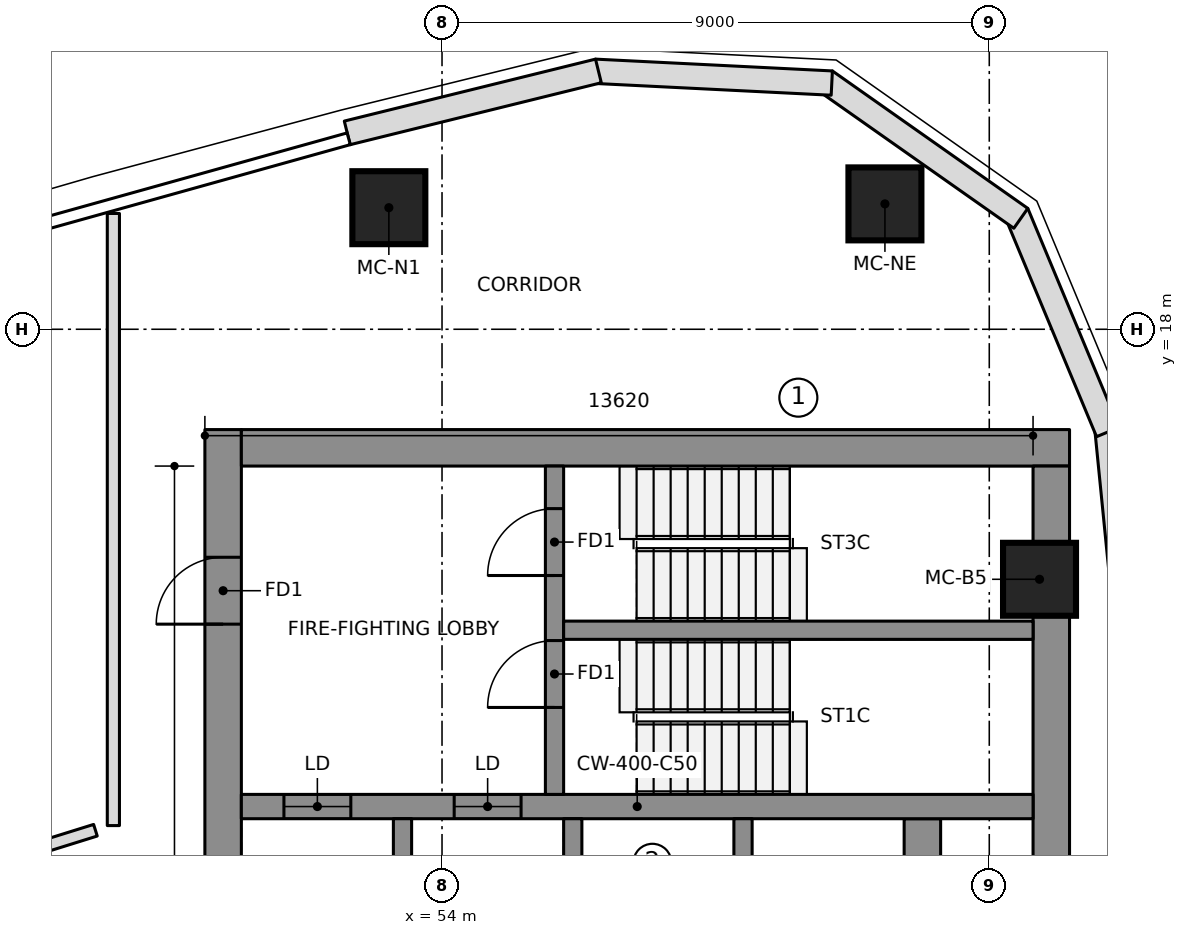
"""IFC4 building model, lengths in metres.
Left out: names, types, materials, properties, quantities, classifications, styles, units other than length and angle.
Written with IfcOpenShell. Run it as: python <this file> out.ifc"""

import sys

from ifc_helpers import new_model, si_unit, direction, frame, frame_2d, origin, origin_2d, place, context, subcontext, project, spatial, polyline, rectangle, outline, extrude, element, fill, save


model = new_model("IFC4")
c1 = context("Model", 3, precision=1e-05, world=origin(), true_north=direction((0.0, 1.0)))
c2 = subcontext(c1, "Body", "Model", "MODEL_VIEW")
j1 = project(units=[si_unit("LENGTHUNIT", "METRE"), si_unit("PLANEANGLEUNIT", "RADIAN")], contexts=[c1])
p1 = place(None, origin())
s1 = spatial("IfcSite", under=j1, at=p1, CompositionType="ELEMENT")
p2 = place(p1, origin())
s2 = spatial("IfcBuilding", under=s1, at=p2, CompositionType="ELEMENT")
p3 = place(p2, frame((0.0, 0.0, 231.45)))
s3 = spatial("IfcBuildingStorey", under=s2, at=p3, CompositionType="ELEMENT", Elevation=231.45)
p4 = place(p3, frame((50.4, 6.65, 0.0), z_axis=(0.0, 0.0, 1.0), x_axis=(0.0, 1.0, 0.0)))
e1 = element("IfcWall", 1, at=p4, inside=s3, PredefinedType="SHEAR", context=c2, shape_type="SweptSolid", body=[
    extrude(rectangle(XDim=9.7, YDim=0.6, at=frame_2d((4.85, 0.0))), origin(), (0.0, 0.0, 1.0), 3.55),
])
p5 = place(p4, frame((6.5, 0.0, 0.0)))
e2 = element("IfcOpeningElement", 2, at=p5, cuts=e1, PredefinedType="OPENING", context=c2, shape_type="SweptSolid", body=[
    extrude(rectangle(XDim=1.1, YDim=2.1, at=frame_2d((0.55, 1.05))), frame((0.0, 0.31, 0.0), z_axis=(0.0, -1.0, 0.0), x_axis=(1.0, 0.0, 0.0)), (0.0, 0.0, 1.0), 0.62),
])
p6 = place(p3, frame((50.7, 16.05, 0.0), z_axis=(0.0, 0.0, 1.0), x_axis=(1.0, 0.0, 0.0)))
e3 = element("IfcWall", 3, at=p6, inside=s3, PredefinedType="SHEAR", context=c2, shape_type="SweptSolid", body=[
    extrude(rectangle(XDim=13.62, YDim=0.6, at=frame_2d((6.81, 0.0))), origin(), (0.0, 0.0, 1.0), 3.55),
])
p7 = place(p3, frame((64.02, 7.502, 0.0), z_axis=(0.0, 0.0, 1.0), x_axis=(0.0, 1.0, 0.0)))
e4 = element("IfcWall", 4, at=p7, inside=s3, PredefinedType="SHEAR", context=c2, shape_type="SweptSolid", body=[
    extrude(rectangle(XDim=8.248, YDim=0.6, at=frame_2d((4.124, 0.0))), origin(), (0.0, 0.0, 1.0), 3.55),
])
p8 = place(p3, frame((61.9, -9.95, 0.0), z_axis=(0.0, 0.0, 1.0), x_axis=(0.0, 1.0, 0.0)))
e5 = element("IfcWall", 5, at=p8, inside=s3, PredefinedType="SHEAR", context=c2, shape_type="SweptSolid", body=[
    extrude(rectangle(XDim=19.9, YDim=0.6, at=frame_2d((9.95, 0.0))), origin(), (0.0, 0.0, 1.0), 3.55),
])
p9 = place(p3, frame((50.7, 10.15, 0.0), z_axis=(0.0, 0.0, 1.0), x_axis=(1.0, 0.0, 0.0)))
e6 = element("IfcWall", 6, at=p9, inside=s3, PredefinedType="SHEAR", context=c2, shape_type="SweptSolid", body=[
    extrude(rectangle(XDim=13.02, YDim=0.4, at=frame_2d((6.51, 0.0))), origin(), (0.0, 0.0, 1.0), 3.55),
])
p10 = place(p9, frame((0.7, 0.0, 0.0)))
e7 = element("IfcOpeningElement", 7, at=p10, cuts=e6, PredefinedType="OPENING", context=c2, shape_type="SweptSolid", body=[
    extrude(rectangle(XDim=1.1, YDim=2.1, at=frame_2d((0.55, 1.05))), frame((0.0, 0.21, 0.0), z_axis=(0.0, -1.0, 0.0), x_axis=(1.0, 0.0, 0.0)), (0.0, 0.0, 1.0), 0.42),
])
p11 = place(p9, frame((3.5, 0.0, 0.0)))
e8 = element("IfcOpeningElement", 8, at=p11, cuts=e6, PredefinedType="OPENING", context=c2, shape_type="SweptSolid", body=[
    extrude(rectangle(XDim=1.1, YDim=2.1, at=frame_2d((0.55, 1.05))), frame((0.0, 0.21, 0.0), z_axis=(0.0, -1.0, 0.0), x_axis=(1.0, 0.0, 0.0)), (0.0, 0.0, 1.0), 0.42),
])
for number, where, z_axis, x_axis in (
    (9, (53.35, 6.95, 0.0), (0.0, 0.0, 1.0), (0.0, 1.0, 0.0)),
    (10, (56.15, 6.95, 0.0), (0.0, 0.0, 1.0), (0.0, 1.0, 0.0)),
    (11, (58.95, 6.95, 0.0), (0.0, 0.0, 1.0), (0.0, 1.0, 0.0)),
):
    element("IfcWall", number, at=place(p3, frame(where, z_axis=z_axis, x_axis=x_axis)), inside=s3, PredefinedType="SHEAR", context=c2, shape_type="SweptSolid", body=[
        extrude(rectangle(XDim=3.0, YDim=0.3, at=frame_2d((1.5, 0.0))), origin(), (0.0, 0.0, 1.0), 3.55),
    ])
p12 = place(p3, frame((55.85, 10.35, 0.0), z_axis=(0.0, 0.0, 1.0), x_axis=(0.0, 1.0, 0.0)))
e12 = element("IfcWall", 12, at=p12, inside=s3, PredefinedType="SHEAR", context=c2, shape_type="SweptSolid", body=[
    extrude(rectangle(XDim=5.4, YDim=0.3, at=frame_2d((2.7, 0.0))), origin(), (0.0, 0.0, 1.0), 3.55),
])
p13 = place(p12, frame((1.43, 0.0, 0.0)))
e13 = element("IfcOpeningElement", 13, at=p13, cuts=e12, PredefinedType="OPENING", context=c2, shape_type="SweptSolid", body=[
    extrude(rectangle(XDim=1.1, YDim=2.1, at=frame_2d((0.55, 1.05))), frame((0.0, 0.16, 0.0), z_axis=(0.0, -1.0, 0.0), x_axis=(1.0, 0.0, 0.0)), (0.0, 0.0, 1.0), 0.32),
])
p14 = place(p12, frame((3.6, 0.0, 0.0)))
e14 = element("IfcOpeningElement", 14, at=p14, cuts=e12, PredefinedType="OPENING", context=c2, shape_type="SweptSolid", body=[
    extrude(rectangle(XDim=1.1, YDim=2.1, at=frame_2d((0.55, 1.05))), frame((0.0, 0.16, 0.0), z_axis=(0.0, -1.0, 0.0), x_axis=(1.0, 0.0, 0.0)), (0.0, 0.0, 1.0), 0.32),
])
p15 = place(p3, frame((56.0, 13.05, 0.0), z_axis=(0.0, 0.0, 1.0), x_axis=(1.0, 0.0, 0.0)))
e15 = element("IfcWall", 15, at=p15, inside=s3, PredefinedType="SHEAR", context=c2, shape_type="SweptSolid", body=[
    extrude(rectangle(XDim=7.72, YDim=0.3, at=frame_2d((3.86, 0.0))), origin(), (0.0, 0.0, 1.0), 3.55),
])
for number, where, z_axis, x_axis in (
    (16, (63.826, 13.888, 0.0), (0.0, 0.0, 1.0), (1.0, 0.0, 0.0)),
    (17, (61.284, 20.062, 0.0), (0.0, 0.0, 1.0), (1.0, 0.0, 0.0)),
    (18, (53.125, 20.0, 0.0), (0.0, 0.0, 1.0), (1.0, 0.0, 0.0)),
):
    element("IfcColumn", number, at=place(p3, frame(where, z_axis=z_axis, x_axis=x_axis)), inside=s3, PredefinedType="COLUMN", context=c2, shape_type="SweptSolid", body=[
        extrude(rectangle(XDim=1.2, YDim=1.2, at=origin_2d()), origin(), (0.0, 0.0, 1.0), 3.55),
    ])
p16 = place(p3, frame((65.342, 12.264, 0.0), z_axis=(0.0, 0.0, 1.0), x_axis=(-0.098718218066, 0.995115427185, 0.0)))
e19 = element("IfcWall", 19, at=p16, inside=s3, PredefinedType="NOTDEFINED", context=c2, shape_type="SweptSolid", body=[
    extrude(outline(polyline([(-0.003, -0.2), (4.123, -0.2), (4.063, 0.2), (0.003, 0.2), (-0.003, -0.2)])), origin(), (0.0, 0.0, 1.0), 3.25),
])
p17 = place(p3, frame((64.938, 16.337, 0.0), z_axis=(0.0, 0.0, 1.0), x_axis=(-0.3844335483, 0.923152667191, 0.0)))
e20 = element("IfcWall", 20, at=p17, inside=s3, PredefinedType="NOTDEFINED", context=c2, shape_type="SweptSolid", body=[
    extrude(outline(polyline([(-0.03, -0.2), (3.871, -0.2), (3.756, 0.2), (0.03, 0.2), (-0.03, -0.2)])), origin(), (0.0, 0.0, 1.0), 3.25),
])
p18 = place(p3, frame((63.471, 19.858, 0.0), z_axis=(0.0, 0.0, 1.0), x_axis=(-0.817942545532, 0.575299915009, 0.0)))
e21 = element("IfcWall", 21, at=p18, inside=s3, PredefinedType="NOTDEFINED", context=c2, shape_type="SweptSolid", body=[
    extrude(outline(polyline([(-0.058, -0.2), (3.871, -0.2), (3.756, 0.2), (0.058, 0.2), (-0.058, -0.2)])), origin(), (0.0, 0.0, 1.0), 3.25),
])
p19 = place(p3, frame((60.352, 22.052, 0.0), z_axis=(0.0, 0.0, 1.0), x_axis=(-0.998758875872, 0.049806705046, 0.0)))
e22 = element("IfcWall", 22, at=p19, inside=s3, PredefinedType="NOTDEFINED", context=c2, shape_type="SweptSolid", body=[
    extrude(outline(polyline([(-0.058, -0.2), (3.843, -0.2), (3.784, 0.2), (0.058, 0.2), (-0.058, -0.2)])), origin(), (0.0, 0.0, 1.0), 3.25),
])
p20 = place(p3, frame((56.543, 22.242, 0.0), z_axis=(0.0, 0.0, 1.0), x_axis=(-0.970902342456, -0.23947576373, 0.0)))
e23 = element("IfcWall", 23, at=p20, inside=s3, PredefinedType="NOTDEFINED", context=c2, shape_type="SweptSolid", body=[
    extrude(outline(polyline([(-0.029, -0.2), (4.226, -0.2), (4.226, 0.2), (0.029, 0.2), (-0.029, -0.2)])), origin(), (0.0, 0.0, 1.0), 3.25),
])
p21 = place(p3, frame((41.898, 7.764, 0.0), z_axis=(0.0, 0.0, 1.0), x_axis=(0.954667015156, 0.297675813886, 0.0)))
e24 = element("IfcWall", 24, at=p21, inside=s3, PredefinedType="PARTITIONING", context=c2, shape_type="SweptSolid", body=[
    extrude(rectangle(XDim=6.706, YDim=0.2, at=frame_2d((3.353, 0.0))), origin(), (0.0, 0.0, 1.0), 3.25),
])
p22 = place(p21, frame((3.95, 0.0, 0.0)))
e25 = element("IfcOpeningElement", 25, at=p22, cuts=e24, PredefinedType="OPENING", context=c2, shape_type="SweptSolid", body=[
    extrude(rectangle(XDim=1.5, YDim=2.1, at=frame_2d((0.75, 1.05))), frame((0.0, 0.11, 0.0), z_axis=(0.0, -1.0, 0.0), x_axis=(1.0, 0.0, 0.0)), (0.0, 0.0, 1.0), 0.22),
])
p23 = place(p3, frame((48.595, 19.904, 0.0), z_axis=(0.0, 0.0, 1.0), x_axis=(0.0, -1.0, 0.0)))
e26 = element("IfcWall", 26, at=p23, inside=s3, PredefinedType="PARTITIONING", context=c2, shape_type="SweptSolid", body=[
    extrude(rectangle(XDim=10.067, YDim=0.2, at=frame_2d((5.034, 0.0))), origin(), (0.0, 0.0, 1.0), 3.25),
])
p24 = place(p10, origin())
e27 = element("IfcDoor", 27, at=p24, inside=s3, OperationType="DOUBLE_DOOR_SLIDING", PredefinedType="DOOR", context=c2, shape_type="SweptSolid", body=[
    extrude(rectangle(XDim=1.1, YDim=2.1, at=frame_2d((0.55, 1.05))), frame((0.0, 0.025, 0.0), z_axis=(0.0, -1.0, 0.0), x_axis=(1.0, 0.0, 0.0)), (0.0, 0.0, 1.0), 0.05),
])
fill(e7, e27)
p25 = place(p11, origin())
e28 = element("IfcDoor", 28, at=p25, inside=s3, OperationType="DOUBLE_DOOR_SLIDING", PredefinedType="DOOR", context=c2, shape_type="SweptSolid", body=[
    extrude(rectangle(XDim=1.1, YDim=2.1, at=frame_2d((0.55, 1.05))), frame((0.0, 0.025, 0.0), z_axis=(0.0, -1.0, 0.0), x_axis=(1.0, 0.0, 0.0)), (0.0, 0.0, 1.0), 0.05),
])
fill(e8, e28)
p26 = place(p13, origin())
e29 = element("IfcDoor", 29, at=p26, inside=s3, OperationType="SINGLE_SWING_RIGHT", PredefinedType="DOOR", context=c2, shape_type="SweptSolid", body=[
    extrude(rectangle(XDim=1.1, YDim=2.1, at=frame_2d((0.55, 1.05))), frame((0.0, 0.025, 0.0), z_axis=(0.0, -1.0, 0.0), x_axis=(1.0, 0.0, 0.0)), (0.0, 0.0, 1.0), 0.05),
])
fill(e13, e29)
p27 = place(p14, origin())
e30 = element("IfcDoor", 30, at=p27, inside=s3, OperationType="SINGLE_SWING_RIGHT", PredefinedType="DOOR", context=c2, shape_type="SweptSolid", body=[
    extrude(rectangle(XDim=1.1, YDim=2.1, at=frame_2d((0.55, 1.05))), frame((0.0, 0.025, 0.0), z_axis=(0.0, -1.0, 0.0), x_axis=(1.0, 0.0, 0.0)), (0.0, 0.0, 1.0), 0.05),
])
fill(e14, e30)
p28 = place(p5, origin())
e31 = element("IfcDoor", 31, at=p28, inside=s3, OperationType="SINGLE_SWING_RIGHT", PredefinedType="DOOR", context=c2, shape_type="SweptSolid", body=[
    extrude(rectangle(XDim=1.1, YDim=2.1, at=frame_2d((0.55, 1.05))), frame((0.0, 0.025, 0.0), z_axis=(0.0, -1.0, 0.0), x_axis=(1.0, 0.0, 0.0)), (0.0, 0.0, 1.0), 0.05),
])
fill(e2, e31)
save(model, sys.argv[1])
